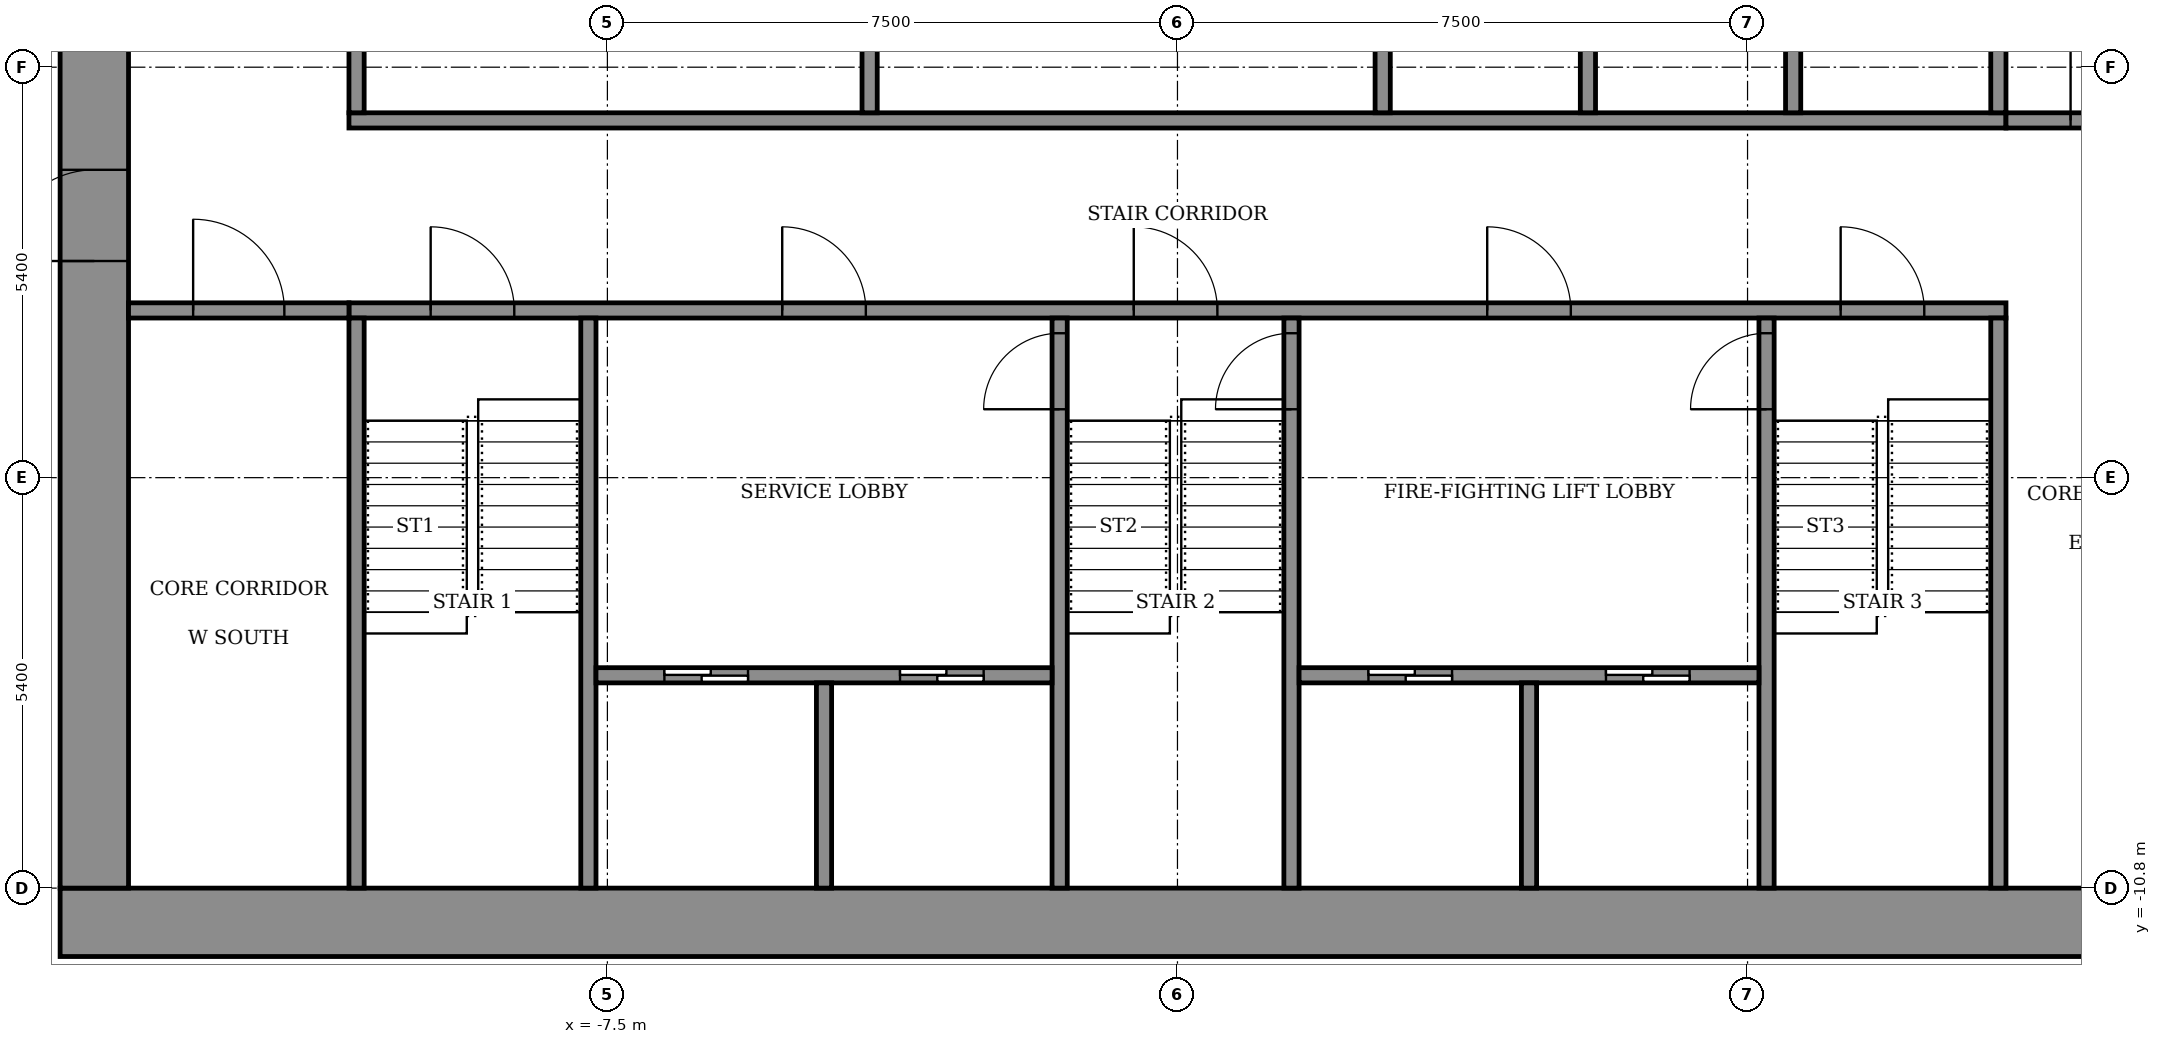
"""IFC4 building model, lengths in metres.
Left out: names, types, materials, properties, quantities, classifications, styles, units other than length and angle.
Written with IfcOpenShell. Run it as: python <this file> out.ifc"""

import sys

from ifc_helpers import new_model, si_unit, direction, frame, frame_2d, origin, place, context, subcontext, project, spatial, rectangle, extrude, element, fill, save


model = new_model("IFC4")
c1 = context("Model", 3, precision=1e-05, world=origin(), true_north=direction((0.0, 1.0)))
c2 = subcontext(c1, "Body", "Model", "MODEL_VIEW")
j1 = project(units=[si_unit("LENGTHUNIT", "METRE"), si_unit("PLANEANGLEUNIT", "RADIAN")], contexts=[c1])
p1 = place(None, origin())
s1 = spatial("IfcSite", under=j1, at=p1, CompositionType="ELEMENT")
p2 = place(p1, origin())
s2 = spatial("IfcBuilding", under=s1, at=p2, CompositionType="ELEMENT")
p3 = place(p2, frame((0.0, 0.0, 186.1)))
s3 = spatial("IfcBuildingStorey", under=s2, at=p3, CompositionType="ELEMENT", Elevation=186.1)
p4 = place(p3, frame((-14.7, -11.25, 0.0), z_axis=(0.0, 0.0, 1.0), x_axis=(1.0, 0.0, 0.0)))
e1 = element("IfcWall", 1, at=p4, inside=s3, PredefinedType="SHEAR", context=c2, shape_type="SweptSolid", body=[
    extrude(rectangle(XDim=29.4, YDim=0.9, at=frame_2d((14.7, 0.0))), origin(), (0.0, 0.0, 1.0), 3.6),
])
p5 = place(p3, frame((-14.25, -10.8, 0.0), z_axis=(0.0, 0.0, 1.0), x_axis=(0.0, 1.0, 0.0)))
e2 = element("IfcWall", 2, at=p5, inside=s3, PredefinedType="SHEAR", context=c2, shape_type="SweptSolid", body=[
    extrude(rectangle(XDim=21.6, YDim=0.9, at=frame_2d((10.8, 0.0))), origin(), (0.0, 0.0, 1.0), 3.6),
])
p6 = place(p5, frame((8.25, 0.0, 0.0)))
e3 = element("IfcOpeningElement", 3, at=p6, cuts=e2, PredefinedType="OPENING", context=c2, shape_type="SweptSolid", body=[
    extrude(rectangle(XDim=1.2, YDim=2.1, at=frame_2d((0.6, 1.05))), frame((0.0, 0.46, 0.0), z_axis=(0.0, -1.0, 0.0), x_axis=(1.0, 0.0, 0.0)), (0.0, 0.0, 1.0), 0.92),
])
p7 = place(p5, frame((15.25, 0.0, 0.0)))
e4 = element("IfcOpeningElement", 4, at=p7, cuts=e2, PredefinedType="OPENING", context=c2, shape_type="SweptSolid", body=[
    extrude(rectangle(XDim=1.2, YDim=2.1, at=frame_2d((0.6, 1.05))), frame((0.0, 0.46, 0.0), z_axis=(0.0, -1.0, 0.0), x_axis=(1.0, 0.0, 0.0)), (0.0, 0.0, 1.0), 0.92),
])
p8 = place(p3, frame((-10.9, -3.2, 0.0), z_axis=(0.0, 0.0, 1.0), x_axis=(1.0, 0.0, 0.0)))
e5 = element("IfcWall", 5, at=p8, inside=s3, PredefinedType="SHEAR", context=c2, shape_type="SweptSolid", body=[
    extrude(rectangle(XDim=21.8, YDim=0.2, at=frame_2d((10.9, 0.0))), origin(), (0.0, 0.0, 1.0), 3.05),
])
p9 = place(p8, frame((1.075, 0.0, 0.0)))
e6 = element("IfcOpeningElement", 6, at=p9, cuts=e5, PredefinedType="OPENING", context=c2, shape_type="SweptSolid", body=[
    extrude(rectangle(XDim=1.1, YDim=2.1, at=frame_2d((0.55, 1.05))), frame((0.0, 0.11, 0.0), z_axis=(0.0, -1.0, 0.0), x_axis=(1.0, 0.0, 0.0)), (0.0, 0.0, 1.0), 0.22),
])
p10 = place(p8, frame((10.325, 0.0, 0.0)))
e7 = element("IfcOpeningElement", 7, at=p10, cuts=e5, PredefinedType="OPENING", context=c2, shape_type="SweptSolid", body=[
    extrude(rectangle(XDim=1.1, YDim=2.1, at=frame_2d((0.55, 1.05))), frame((0.0, 0.11, 0.0), z_axis=(0.0, -1.0, 0.0), x_axis=(1.0, 0.0, 0.0)), (0.0, 0.0, 1.0), 0.22),
])
p11 = place(p8, frame((19.625, 0.0, 0.0)))
e8 = element("IfcOpeningElement", 8, at=p11, cuts=e5, PredefinedType="OPENING", context=c2, shape_type="SweptSolid", body=[
    extrude(rectangle(XDim=1.1, YDim=2.1, at=frame_2d((0.55, 1.05))), frame((0.0, 0.11, 0.0), z_axis=(0.0, -1.0, 0.0), x_axis=(1.0, 0.0, 0.0)), (0.0, 0.0, 1.0), 0.22),
])
p12 = place(p8, frame((5.7, 0.0, 0.0)))
e9 = element("IfcOpeningElement", 9, at=p12, cuts=e5, PredefinedType="OPENING", context=c2, shape_type="SweptSolid", body=[
    extrude(rectangle(XDim=1.1, YDim=2.1, at=frame_2d((0.55, 1.05))), frame((0.0, 0.11, 0.0), z_axis=(0.0, -1.0, 0.0), x_axis=(1.0, 0.0, 0.0)), (0.0, 0.0, 1.0), 0.22),
])
p13 = place(p8, frame((14.975, 0.0, 0.0)))
e10 = element("IfcOpeningElement", 10, at=p13, cuts=e5, PredefinedType="OPENING", context=c2, shape_type="SweptSolid", body=[
    extrude(rectangle(XDim=1.1, YDim=2.1, at=frame_2d((0.55, 1.05))), frame((0.0, 0.11, 0.0), z_axis=(0.0, -1.0, 0.0), x_axis=(1.0, 0.0, 0.0)), (0.0, 0.0, 1.0), 0.22),
])
p14 = place(p3, frame((-10.9, -0.7, 0.0), z_axis=(0.0, 0.0, 1.0), x_axis=(1.0, 0.0, 0.0)))
e11 = element("IfcWall", 11, at=p14, inside=s3, PredefinedType="SHEAR", context=c2, shape_type="SweptSolid", body=[
    extrude(rectangle(XDim=21.8, YDim=0.2, at=frame_2d((10.9, 0.0))), origin(), (0.0, 0.0, 1.0), 3.05),
])
for number, where, z_axis, x_axis in (
    (12, (-10.8, -10.8, 0.0), (0.0, 0.0, 1.0), (0.0, 1.0, 0.0)),
    (13, (-7.75, -10.8, 0.0), (0.0, 0.0, 1.0), (0.0, 1.0, 0.0)),
):
    element("IfcWall", number, at=place(p3, frame(where, z_axis=z_axis, x_axis=x_axis)), inside=s3, PredefinedType="SHEAR", context=c2, shape_type="SweptSolid", body=[
        extrude(rectangle(XDim=7.5, YDim=0.2, at=frame_2d((3.75, 0.0))), origin(), (0.0, 0.0, 1.0), 3.05),
    ])
p15 = place(p3, frame((-1.55, -10.8, 0.0), z_axis=(0.0, 0.0, 1.0), x_axis=(0.0, 1.0, 0.0)))
e14 = element("IfcWall", 14, at=p15, inside=s3, PredefinedType="SHEAR", context=c2, shape_type="SweptSolid", body=[
    extrude(rectangle(XDim=7.5, YDim=0.2, at=frame_2d((3.75, 0.0))), origin(), (0.0, 0.0, 1.0), 3.05),
])
p16 = place(p15, frame((6.3, 0.0, 0.0)))
e15 = element("IfcOpeningElement", 15, at=p16, cuts=e14, PredefinedType="OPENING", context=c2, shape_type="SweptSolid", body=[
    extrude(rectangle(XDim=1.0, YDim=2.1, at=frame_2d((0.5, 1.05))), frame((0.0, 0.11, 0.0), z_axis=(0.0, -1.0, 0.0), x_axis=(1.0, 0.0, 0.0)), (0.0, 0.0, 1.0), 0.22),
])
p17 = place(p3, frame((1.5, -10.8, 0.0), z_axis=(0.0, 0.0, 1.0), x_axis=(0.0, 1.0, 0.0)))
e16 = element("IfcWall", 16, at=p17, inside=s3, PredefinedType="SHEAR", context=c2, shape_type="SweptSolid", body=[
    extrude(rectangle(XDim=7.5, YDim=0.2, at=frame_2d((3.75, 0.0))), origin(), (0.0, 0.0, 1.0), 3.05),
])
p18 = place(p17, frame((6.3, 0.0, 0.0)))
e17 = element("IfcOpeningElement", 17, at=p18, cuts=e16, PredefinedType="OPENING", context=c2, shape_type="SweptSolid", body=[
    extrude(rectangle(XDim=1.0, YDim=2.1, at=frame_2d((0.5, 1.05))), frame((0.0, 0.11, 0.0), z_axis=(0.0, -1.0, 0.0), x_axis=(1.0, 0.0, 0.0)), (0.0, 0.0, 1.0), 0.22),
])
p19 = place(p3, frame((7.75, -10.8, 0.0), z_axis=(0.0, 0.0, 1.0), x_axis=(0.0, 1.0, 0.0)))
e18 = element("IfcWall", 18, at=p19, inside=s3, PredefinedType="SHEAR", context=c2, shape_type="SweptSolid", body=[
    extrude(rectangle(XDim=7.5, YDim=0.2, at=frame_2d((3.75, 0.0))), origin(), (0.0, 0.0, 1.0), 3.05),
])
p20 = place(p19, frame((6.3, 0.0, 0.0)))
e19 = element("IfcOpeningElement", 19, at=p20, cuts=e18, PredefinedType="OPENING", context=c2, shape_type="SweptSolid", body=[
    extrude(rectangle(XDim=1.0, YDim=2.1, at=frame_2d((0.5, 1.05))), frame((0.0, 0.11, 0.0), z_axis=(0.0, -1.0, 0.0), x_axis=(1.0, 0.0, 0.0)), (0.0, 0.0, 1.0), 0.22),
])
p21 = place(p3, frame((10.8, -10.8, 0.0), z_axis=(0.0, 0.0, 1.0), x_axis=(0.0, 1.0, 0.0)))
e20 = element("IfcWall", 20, at=p21, inside=s3, PredefinedType="SHEAR", context=c2, shape_type="SweptSolid", body=[
    extrude(rectangle(XDim=7.5, YDim=0.2, at=frame_2d((3.75, 0.0))), origin(), (0.0, 0.0, 1.0), 3.05),
])
p22 = place(p3, frame((-7.65, -8.0, 0.0), z_axis=(0.0, 0.0, 1.0), x_axis=(1.0, 0.0, 0.0)))
e21 = element("IfcWall", 21, at=p22, inside=s3, PredefinedType="SHEAR", context=c2, shape_type="SweptSolid", body=[
    extrude(rectangle(XDim=6.0, YDim=0.2, at=frame_2d((3.0, 0.0))), origin(), (0.0, 0.0, 1.0), 3.05),
])
p23 = place(p22, frame((0.9, 0.0, 0.0)))
e22 = element("IfcOpeningElement", 22, at=p23, cuts=e21, PredefinedType="OPENING", context=c2, shape_type="SweptSolid", body=[
    extrude(rectangle(XDim=1.1, YDim=2.1, at=frame_2d((0.55, 1.05))), frame((0.0, 0.11, 0.0), z_axis=(0.0, -1.0, 0.0), x_axis=(1.0, 0.0, 0.0)), (0.0, 0.0, 1.0), 0.22),
])
p24 = place(p22, frame((4.0, 0.0, 0.0)))
e23 = element("IfcOpeningElement", 23, at=p24, cuts=e21, PredefinedType="OPENING", context=c2, shape_type="SweptSolid", body=[
    extrude(rectangle(XDim=1.1, YDim=2.1, at=frame_2d((0.55, 1.05))), frame((0.0, 0.11, 0.0), z_axis=(0.0, -1.0, 0.0), x_axis=(1.0, 0.0, 0.0)), (0.0, 0.0, 1.0), 0.22),
])
p25 = place(p3, frame((-4.65, -10.8, 0.0), z_axis=(0.0, 0.0, 1.0), x_axis=(0.0, 1.0, 0.0)))
e24 = element("IfcWall", 24, at=p25, inside=s3, PredefinedType="SHEAR", context=c2, shape_type="SweptSolid", body=[
    extrude(rectangle(XDim=2.7, YDim=0.2, at=frame_2d((1.35, 0.0))), origin(), (0.0, 0.0, 1.0), 3.05),
])
p26 = place(p3, frame((1.6, -8.0, 0.0), z_axis=(0.0, 0.0, 1.0), x_axis=(1.0, 0.0, 0.0)))
e25 = element("IfcWall", 25, at=p26, inside=s3, PredefinedType="SHEAR", context=c2, shape_type="SweptSolid", body=[
    extrude(rectangle(XDim=6.05, YDim=0.2, at=frame_2d((3.025, 0.0))), origin(), (0.0, 0.0, 1.0), 3.05),
])
p27 = place(p26, frame((0.913, 0.0, 0.0)))
e26 = element("IfcOpeningElement", 26, at=p27, cuts=e25, PredefinedType="OPENING", context=c2, shape_type="SweptSolid", body=[
    extrude(rectangle(XDim=1.1, YDim=2.1, at=frame_2d((0.55, 1.05))), frame((0.0, 0.11, 0.0), z_axis=(0.0, -1.0, 0.0), x_axis=(1.0, 0.0, 0.0)), (0.0, 0.0, 1.0), 0.22),
])
p28 = place(p26, frame((4.038, 0.0, 0.0)))
e27 = element("IfcOpeningElement", 27, at=p28, cuts=e25, PredefinedType="OPENING", context=c2, shape_type="SweptSolid", body=[
    extrude(rectangle(XDim=1.1, YDim=2.1, at=frame_2d((0.55, 1.05))), frame((0.0, 0.11, 0.0), z_axis=(0.0, -1.0, 0.0), x_axis=(1.0, 0.0, 0.0)), (0.0, 0.0, 1.0), 0.22),
])
p29 = place(p3, frame((4.625, -10.8, 0.0), z_axis=(0.0, 0.0, 1.0), x_axis=(0.0, 1.0, 0.0)))
e28 = element("IfcWall", 28, at=p29, inside=s3, PredefinedType="SHEAR", context=c2, shape_type="SweptSolid", body=[
    extrude(rectangle(XDim=2.7, YDim=0.2, at=frame_2d((1.35, 0.0))), origin(), (0.0, 0.0, 1.0), 3.05),
])
for number, where, z_axis, x_axis in (
    (29, (-10.8, -0.6, 0.0), (0.0, 0.0, 1.0), (0.0, 1.0, 0.0)),
    (30, (-4.05, -0.6, 0.0), (0.0, 0.0, 1.0), (0.0, 1.0, 0.0)),
):
    element("IfcWall", number, at=place(p3, frame(where, z_axis=z_axis, x_axis=x_axis)), inside=s3, PredefinedType="STANDARD", context=c2, shape_type="SweptSolid", body=[
        extrude(rectangle(XDim=2.5, YDim=0.2, at=frame_2d((1.25, 0.0))), origin(), (0.0, 0.0, 1.0), 3.05),
    ])
for number, where, z_axis, x_axis in (
    (31, (2.7, -0.6, 0.0), (0.0, 0.0, 1.0), (0.0, 1.0, 0.0)),
    (32, (5.4, -0.6, 0.0), (0.0, 0.0, 1.0), (0.0, 1.0, 0.0)),
    (33, (8.1, -0.6, 0.0), (0.0, 0.0, 1.0), (0.0, 1.0, 0.0)),
    (34, (10.8, -0.6, 0.0), (0.0, 0.0, 1.0), (0.0, 1.0, 0.0)),
):
    element("IfcWall", number, at=place(p3, frame(where, z_axis=z_axis, x_axis=x_axis)), inside=s3, PredefinedType="SHEAR", context=c2, shape_type="SweptSolid", body=[
        extrude(rectangle(XDim=2.5, YDim=0.2, at=frame_2d((1.25, 0.0))), origin(), (0.0, 0.0, 1.0), 3.05),
    ])
p30 = place(p3, frame((-13.8, -3.2, 0.0), z_axis=(0.0, 0.0, 1.0), x_axis=(1.0, 0.0, 0.0)))
e35 = element("IfcWall", 35, at=p30, inside=s3, PredefinedType="STANDARD", context=c2, shape_type="SweptSolid", body=[
    extrude(rectangle(XDim=2.9, YDim=0.2, at=frame_2d((1.45, 0.0))), origin(), (0.0, 0.0, 1.0), 3.05),
])
p31 = place(p30, frame((0.85, 0.0, 0.0)))
e36 = element("IfcOpeningElement", 36, at=p31, cuts=e35, PredefinedType="OPENING", context=c2, shape_type="SweptSolid", body=[
    extrude(rectangle(XDim=1.2, YDim=2.1, at=frame_2d((0.6, 1.05))), frame((0.0, 0.11, 0.0), z_axis=(0.0, -1.0, 0.0), x_axis=(1.0, 0.0, 0.0)), (0.0, 0.0, 1.0), 0.22),
])
p32 = place(p3, frame((10.9, -0.7, 0.0), z_axis=(0.0, 0.0, 1.0), x_axis=(1.0, 0.0, 0.0)))
e37 = element("IfcWall", 37, at=p32, inside=s3, PredefinedType="STANDARD", context=c2, shape_type="SweptSolid", body=[
    extrude(rectangle(XDim=2.9, YDim=0.2, at=frame_2d((1.45, 0.0))), origin(), (0.0, 0.0, 1.0), 3.05),
])
p33 = place(p32, frame((0.85, 0.0, 0.0)))
e38 = element("IfcOpeningElement", 38, at=p33, cuts=e37, PredefinedType="OPENING", context=c2, shape_type="SweptSolid", body=[
    extrude(rectangle(XDim=1.2, YDim=2.1, at=frame_2d((0.6, 1.05))), frame((0.0, 0.11, 0.0), z_axis=(0.0, -1.0, 0.0), x_axis=(1.0, 0.0, 0.0)), (0.0, 0.0, 1.0), 0.22),
])
p34 = place(p6, origin())
e39 = element("IfcDoor", 39, at=p34, inside=s3, OperationType="DOUBLE_DOOR_SINGLE_SWING", PredefinedType="DOOR", context=c2, shape_type="SweptSolid", body=[
    extrude(rectangle(XDim=1.2, YDim=2.1, at=frame_2d((0.6, 1.05))), frame((0.0, 0.025, 0.0), z_axis=(0.0, -1.0, 0.0), x_axis=(1.0, 0.0, 0.0)), (0.0, 0.0, 1.0), 0.05),
])
fill(e3, e39)
p35 = place(p27, origin())
e40 = element("IfcDoor", 40, at=p35, inside=s3, OperationType="SLIDING_TO_LEFT", PredefinedType="DOOR", context=c2, shape_type="SweptSolid", body=[
    extrude(rectangle(XDim=1.1, YDim=2.1, at=frame_2d((0.55, 1.05))), frame((0.0, 0.025, 0.0), z_axis=(0.0, -1.0, 0.0), x_axis=(1.0, 0.0, 0.0)), (0.0, 0.0, 1.0), 0.05),
])
fill(e26, e40)
p36 = place(p23, origin())
e41 = element("IfcDoor", 41, at=p36, inside=s3, OperationType="SLIDING_TO_LEFT", PredefinedType="DOOR", context=c2, shape_type="SweptSolid", body=[
    extrude(rectangle(XDim=1.1, YDim=2.1, at=frame_2d((0.55, 1.05))), frame((0.0, 0.025, 0.0), z_axis=(0.0, -1.0, 0.0), x_axis=(1.0, 0.0, 0.0)), (0.0, 0.0, 1.0), 0.05),
])
fill(e22, e41)
p37 = place(p28, origin())
e42 = element("IfcDoor", 42, at=p37, inside=s3, OperationType="SLIDING_TO_LEFT", PredefinedType="DOOR", context=c2, shape_type="SweptSolid", body=[
    extrude(rectangle(XDim=1.1, YDim=2.1, at=frame_2d((0.55, 1.05))), frame((0.0, 0.025, 0.0), z_axis=(0.0, -1.0, 0.0), x_axis=(1.0, 0.0, 0.0)), (0.0, 0.0, 1.0), 0.05),
])
fill(e27, e42)
p38 = place(p24, origin())
e43 = element("IfcDoor", 43, at=p38, inside=s3, OperationType="SLIDING_TO_LEFT", PredefinedType="DOOR", context=c2, shape_type="SweptSolid", body=[
    extrude(rectangle(XDim=1.1, YDim=2.1, at=frame_2d((0.55, 1.05))), frame((0.0, 0.025, 0.0), z_axis=(0.0, -1.0, 0.0), x_axis=(1.0, 0.0, 0.0)), (0.0, 0.0, 1.0), 0.05),
])
fill(e23, e43)
p39 = place(p9, origin())
e44 = element("IfcDoor", 44, at=p39, inside=s3, OperationType="SINGLE_SWING_RIGHT", PredefinedType="DOOR", context=c2, shape_type="SweptSolid", body=[
    extrude(rectangle(XDim=1.1, YDim=2.1, at=frame_2d((0.55, 1.05))), frame((0.0, 0.025, 0.0), z_axis=(0.0, -1.0, 0.0), x_axis=(1.0, 0.0, 0.0)), (0.0, 0.0, 1.0), 0.05),
])
fill(e6, e44)
p40 = place(p10, origin())
e45 = element("IfcDoor", 45, at=p40, inside=s3, OperationType="SINGLE_SWING_RIGHT", PredefinedType="DOOR", context=c2, shape_type="SweptSolid", body=[
    extrude(rectangle(XDim=1.1, YDim=2.1, at=frame_2d((0.55, 1.05))), frame((0.0, 0.025, 0.0), z_axis=(0.0, -1.0, 0.0), x_axis=(1.0, 0.0, 0.0)), (0.0, 0.0, 1.0), 0.05),
])
fill(e7, e45)
p41 = place(p11, origin())
e46 = element("IfcDoor", 46, at=p41, inside=s3, OperationType="SINGLE_SWING_RIGHT", PredefinedType="DOOR", context=c2, shape_type="SweptSolid", body=[
    extrude(rectangle(XDim=1.1, YDim=2.1, at=frame_2d((0.55, 1.05))), frame((0.0, 0.025, 0.0), z_axis=(0.0, -1.0, 0.0), x_axis=(1.0, 0.0, 0.0)), (0.0, 0.0, 1.0), 0.05),
])
fill(e8, e46)
p42 = place(p12, origin())
e47 = element("IfcDoor", 47, at=p42, inside=s3, OperationType="SINGLE_SWING_LEFT", PredefinedType="DOOR", context=c2, shape_type="SweptSolid", body=[
    extrude(rectangle(XDim=1.1, YDim=2.1, at=frame_2d((0.55, 1.05))), frame((0.0, 0.025, 0.0), z_axis=(0.0, -1.0, 0.0), x_axis=(1.0, 0.0, 0.0)), (0.0, 0.0, 1.0), 0.05),
])
fill(e9, e47)
p43 = place(p13, origin())
e48 = element("IfcDoor", 48, at=p43, inside=s3, OperationType="SINGLE_SWING_LEFT", PredefinedType="DOOR", context=c2, shape_type="SweptSolid", body=[
    extrude(rectangle(XDim=1.1, YDim=2.1, at=frame_2d((0.55, 1.05))), frame((0.0, 0.025, 0.0), z_axis=(0.0, -1.0, 0.0), x_axis=(1.0, 0.0, 0.0)), (0.0, 0.0, 1.0), 0.05),
])
fill(e10, e48)
p44 = place(p16, origin())
e49 = element("IfcDoor", 49, at=p44, inside=s3, OperationType="SINGLE_SWING_RIGHT", PredefinedType="DOOR", context=c2, shape_type="SweptSolid", body=[
    extrude(rectangle(XDim=1.0, YDim=2.1, at=frame_2d((0.5, 1.05))), frame((0.0, 0.025, 0.0), z_axis=(0.0, -1.0, 0.0), x_axis=(1.0, 0.0, 0.0)), (0.0, 0.0, 1.0), 0.05),
])
fill(e15, e49)
p45 = place(p18, origin())
e50 = element("IfcDoor", 50, at=p45, inside=s3, OperationType="SINGLE_SWING_RIGHT", PredefinedType="DOOR", context=c2, shape_type="SweptSolid", body=[
    extrude(rectangle(XDim=1.0, YDim=2.1, at=frame_2d((0.5, 1.05))), frame((0.0, 0.025, 0.0), z_axis=(0.0, -1.0, 0.0), x_axis=(1.0, 0.0, 0.0)), (0.0, 0.0, 1.0), 0.05),
])
fill(e17, e50)
p46 = place(p20, origin())
e51 = element("IfcDoor", 51, at=p46, inside=s3, OperationType="SINGLE_SWING_RIGHT", PredefinedType="DOOR", context=c2, shape_type="SweptSolid", body=[
    extrude(rectangle(XDim=1.0, YDim=2.1, at=frame_2d((0.5, 1.05))), frame((0.0, 0.025, 0.0), z_axis=(0.0, -1.0, 0.0), x_axis=(1.0, 0.0, 0.0)), (0.0, 0.0, 1.0), 0.05),
])
fill(e19, e51)
p47 = place(p31, origin())
e52 = element("IfcDoor", 52, at=p47, inside=s3, OperationType="SINGLE_SWING_LEFT", PredefinedType="DOOR", context=c2, shape_type="SweptSolid", body=[
    extrude(rectangle(XDim=1.2, YDim=2.1, at=frame_2d((0.6, 1.05))), frame((0.0, 0.025, 0.0), z_axis=(0.0, -1.0, 0.0), x_axis=(1.0, 0.0, 0.0)), (0.0, 0.0, 1.0), 0.05),
])
fill(e36, e52)
p48 = place(p33, origin())
e53 = element("IfcDoor", 53, at=p48, inside=s3, OperationType="SINGLE_SWING_LEFT", PredefinedType="DOOR", context=c2, shape_type="SweptSolid", body=[
    extrude(rectangle(XDim=1.2, YDim=2.1, at=frame_2d((0.6, 1.05))), frame((0.0, 0.025, 0.0), z_axis=(0.0, -1.0, 0.0), x_axis=(1.0, 0.0, 0.0)), (0.0, 0.0, 1.0), 0.05),
])
fill(e38, e53)
save(model, sys.argv[1])
